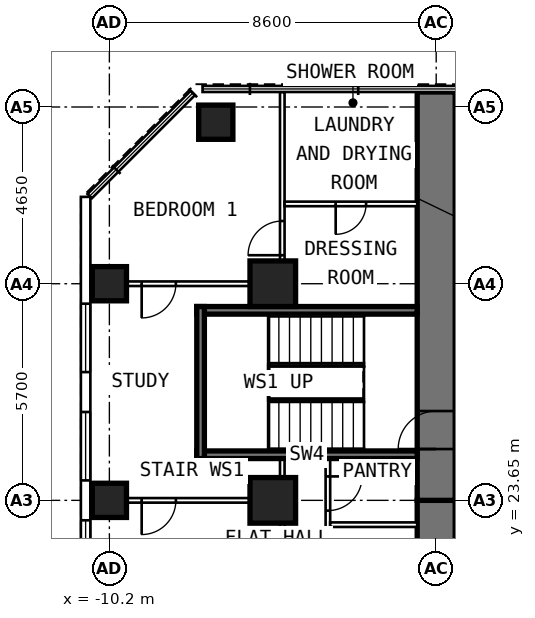
"""IFC4 building model, lengths in metres.
Left out: names, types, materials, properties, quantities, classifications, styles, units other than length and angle.
Written with IfcOpenShell. Run it as: python <this file> out.ifc"""

import sys

from ifc_helpers import new_model, si_unit, direction, frame, frame_2d, origin, origin_2d, place, context, subcontext, project, spatial, rectangle, extrude, element, fill, save


model = new_model("IFC4")
c1 = context("Model", 3, precision=1e-05, world=origin(), true_north=direction((0.0, 1.0)))
c2 = subcontext(c1, "Body", "Model", "MODEL_VIEW")
j1 = project(units=[si_unit("LENGTHUNIT", "METRE"), si_unit("PLANEANGLEUNIT", "RADIAN")], contexts=[c1])
p1 = place(None, origin())
s1 = spatial("IfcSite", under=j1, at=p1, CompositionType="ELEMENT")
p2 = place(p1, origin())
s2 = spatial("IfcBuilding", under=s1, at=p2, CompositionType="ELEMENT")
p3 = place(p2, frame((0.0, 0.0, 80.8)))
s3 = spatial("IfcBuildingStorey", under=s2, at=p3, CompositionType="ELEMENT", Elevation=80.8)
for number, where, z_axis, x_axis in (
    (1, (-10.2, 23.65, 0.0), (0.0, 0.0, 1.0), (0.0, 1.0, 0.0)),
    (2, (-10.2, 29.35, 0.0), (0.0, 0.0, 1.0), (0.0, 1.0, 0.0)),
    (3, (-7.4, 33.6, 0.0), (0.0, 0.0, 1.0), (0.0, 1.0, 0.0)),
):
    element("IfcColumn", number, at=place(p3, frame(where, z_axis=z_axis, x_axis=x_axis)), inside=s3, PredefinedType="COLUMN", context=c2, shape_type="SweptSolid", body=[
        extrude(rectangle(XDim=0.9, YDim=0.9, at=origin_2d()), origin(), (0.0, 0.0, 1.0), 3.6),
    ])
for number, where, z_axis, x_axis in (
    (4, (-5.9, 23.65, 0.0), (0.0, 0.0, 1.0), (0.0, 1.0, 0.0)),
    (5, (-5.9, 29.35, 0.0), (0.0, 0.0, 1.0), (0.0, 1.0, 0.0)),
):
    element("IfcColumn", number, at=place(p3, frame(where, z_axis=z_axis, x_axis=x_axis)), inside=s3, PredefinedType="COLUMN", context=c2, shape_type="SweptSolid", body=[
        extrude(rectangle(XDim=1.2, YDim=1.2, at=origin_2d()), origin(), (0.0, 0.0, 1.0), 3.6),
    ])
p4 = place(p3, frame((-1.6, 17.95, 0.0), z_axis=(0.0, 0.0, 1.0), x_axis=(0.0, 1.0, 0.0)))
e6 = element("IfcWall", 6, at=p4, inside=s3, PredefinedType="SHEAR", context=c2, shape_type="SweptSolid", body=[
    extrude(rectangle(XDim=5.7, YDim=1.0, at=frame_2d((2.85, 0.0))), origin(), (0.0, 0.0, 1.0), 3.6),
])
p5 = place(p4, frame((0.9, 0.0, 0.0)))
e7 = element("IfcOpeningElement", 7, at=p5, cuts=e6, PredefinedType="OPENING", context=c2, shape_type="SweptSolid", body=[
    extrude(rectangle(XDim=1.0, YDim=2.1, at=frame_2d((0.5, 1.05))), frame((0.0, 0.512, 0.0), z_axis=(0.0, -1.0, 0.0), x_axis=(1.0, 0.0, 0.0)), (0.0, 0.0, 1.0), 1.024),
])
p6 = place(p3, frame((-1.6, 23.65, 0.0), z_axis=(0.0, 0.0, 1.0), x_axis=(0.0, 1.0, 0.0)))
e8 = element("IfcWall", 8, at=p6, inside=s3, PredefinedType="SHEAR", context=c2, shape_type="SweptSolid", body=[
    extrude(rectangle(XDim=10.745, YDim=1.0, at=frame_2d((5.373, 0.0))), origin(), (0.0, 0.0, 1.0), 3.6),
])
p7 = place(p6, frame((1.35, 0.0, 0.0)))
e9 = element("IfcOpeningElement", 9, at=p7, cuts=e8, PredefinedType="OPENING", context=c2, shape_type="SweptSolid", body=[
    extrude(rectangle(XDim=1.0, YDim=2.1, at=frame_2d((0.5, 1.05))), frame((0.0, 0.512, 0.0), z_axis=(0.0, -1.0, 0.0), x_axis=(1.0, 0.0, 0.0)), (0.0, 0.0, 1.0), 1.024),
])
p8 = place(p3, frame((-10.825, 6.148, 0.0), z_axis=(0.0, 0.0, 1.0), x_axis=(0.0, 1.0, 0.0)))
e10 = element("IfcWall", 10, at=p8, inside=s3, PredefinedType="SOLIDWALL", context=c2, shape_type="SweptSolid", body=[
    extrude(rectangle(XDim=25.487, YDim=0.25, at=frame_2d((12.744, 0.0))), origin(), (0.0, 0.0, 1.0), 3.35),
])
p9 = place(p8, frame((0.927, 0.0, 0.8)))
e11 = element("IfcOpeningElement", 11, at=p9, cuts=e10, PredefinedType="OPENING", context=c2, shape_type="SweptSolid", body=[
    extrude(rectangle(XDim=1.8, YDim=1.8, at=frame_2d((0.9, 0.9))), frame((0.0, 0.137, 0.0), z_axis=(0.0, -1.0, 0.0), x_axis=(1.0, 0.0, 0.0)), (0.0, 0.0, 1.0), 0.274),
])
p10 = place(p8, frame((3.777, 0.0, 0.8)))
e12 = element("IfcOpeningElement", 12, at=p10, cuts=e10, PredefinedType="OPENING", context=c2, shape_type="SweptSolid", body=[
    extrude(rectangle(XDim=1.8, YDim=1.8, at=frame_2d((0.9, 0.9))), frame((0.0, 0.137, 0.0), z_axis=(0.0, -1.0, 0.0), x_axis=(1.0, 0.0, 0.0)), (0.0, 0.0, 1.0), 0.274),
])
p11 = place(p8, frame((6.627, 0.0, 0.8)))
e13 = element("IfcOpeningElement", 13, at=p11, cuts=e10, PredefinedType="OPENING", context=c2, shape_type="SweptSolid", body=[
    extrude(rectangle(XDim=1.8, YDim=1.8, at=frame_2d((0.9, 0.9))), frame((0.0, 0.137, 0.0), z_axis=(0.0, -1.0, 0.0), x_axis=(1.0, 0.0, 0.0)), (0.0, 0.0, 1.0), 0.274),
])
p12 = place(p8, frame((9.477, 0.0, 0.8)))
e14 = element("IfcOpeningElement", 14, at=p12, cuts=e10, PredefinedType="OPENING", context=c2, shape_type="SweptSolid", body=[
    extrude(rectangle(XDim=1.8, YDim=1.8, at=frame_2d((0.9, 0.9))), frame((0.0, 0.137, 0.0), z_axis=(0.0, -1.0, 0.0), x_axis=(1.0, 0.0, 0.0)), (0.0, 0.0, 1.0), 0.274),
])
p13 = place(p8, frame((12.327, 0.0, 0.8)))
e15 = element("IfcOpeningElement", 15, at=p13, cuts=e10, PredefinedType="OPENING", context=c2, shape_type="SweptSolid", body=[
    extrude(rectangle(XDim=1.8, YDim=1.8, at=frame_2d((0.9, 0.9))), frame((0.0, 0.137, 0.0), z_axis=(0.0, -1.0, 0.0), x_axis=(1.0, 0.0, 0.0)), (0.0, 0.0, 1.0), 0.274),
])
p14 = place(p8, frame((15.177, 0.0, 0.8)))
e16 = element("IfcOpeningElement", 16, at=p14, cuts=e10, PredefinedType="OPENING", context=c2, shape_type="SweptSolid", body=[
    extrude(rectangle(XDim=1.8, YDim=1.8, at=frame_2d((0.9, 0.9))), frame((0.0, 0.137, 0.0), z_axis=(0.0, -1.0, 0.0), x_axis=(1.0, 0.0, 0.0)), (0.0, 0.0, 1.0), 0.274),
])
p15 = place(p8, frame((18.027, 0.0, 0.8)))
e17 = element("IfcOpeningElement", 17, at=p15, cuts=e10, PredefinedType="OPENING", context=c2, shape_type="SweptSolid", body=[
    extrude(rectangle(XDim=1.8, YDim=1.8, at=frame_2d((0.9, 0.9))), frame((0.0, 0.137, 0.0), z_axis=(0.0, -1.0, 0.0), x_axis=(1.0, 0.0, 0.0)), (0.0, 0.0, 1.0), 0.274),
])
p16 = place(p8, frame((20.877, 0.0, 0.8)))
e18 = element("IfcOpeningElement", 18, at=p16, cuts=e10, PredefinedType="OPENING", context=c2, shape_type="SweptSolid", body=[
    extrude(rectangle(XDim=1.8, YDim=1.8, at=frame_2d((0.9, 0.9))), frame((0.0, 0.137, 0.0), z_axis=(0.0, -1.0, 0.0), x_axis=(1.0, 0.0, 0.0)), (0.0, 0.0, 1.0), 0.274),
])
p17 = place(p3, frame((-4.45, 18.05, 0.0), z_axis=(0.0, 0.0, 1.0), x_axis=(0.0, 1.0, 0.0)))
e19 = element("IfcWall", 19, at=p17, inside=s3, PredefinedType="PARTITIONING", context=c2, shape_type="SweptSolid", body=[
    extrude(rectangle(XDim=6.7, YDim=0.12, at=frame_2d((3.35, 0.0))), origin(), (0.0, 0.0, 1.0), 3.35),
])
p18 = place(p17, frame((0.75, 0.0, 0.0)))
e20 = element("IfcOpeningElement", 20, at=p18, cuts=e19, PredefinedType="OPENING", context=c2, shape_type="SweptSolid", body=[
    extrude(rectangle(XDim=0.9, YDim=2.1, at=frame_2d((0.45, 1.05))), frame((0.0, 0.072, 0.0), z_axis=(0.0, -1.0, 0.0), x_axis=(1.0, 0.0, 0.0)), (0.0, 0.0, 1.0), 0.144),
])
p19 = place(p17, frame((3.33, 0.0, 0.0)))
e21 = element("IfcOpeningElement", 21, at=p19, cuts=e19, PredefinedType="OPENING", context=c2, shape_type="SweptSolid", body=[
    extrude(rectangle(XDim=0.8, YDim=2.1, at=frame_2d((0.4, 1.05))), frame((0.0, 0.072, 0.0), z_axis=(0.0, -1.0, 0.0), x_axis=(1.0, 0.0, 0.0)), (0.0, 0.0, 1.0), 0.144),
])
p20 = place(p17, frame((5.33, 0.0, 0.0)))
e22 = element("IfcOpeningElement", 22, at=p20, cuts=e19, PredefinedType="OPENING", context=c2, shape_type="SweptSolid", body=[
    extrude(rectangle(XDim=0.9, YDim=2.1, at=frame_2d((0.45, 1.05))), frame((0.0, 0.072, 0.0), z_axis=(0.0, -1.0, 0.0), x_axis=(1.0, 0.0, 0.0)), (0.0, 0.0, 1.0), 0.144),
])
p21 = place(p3, frame((-5.65, 18.05, 0.0), z_axis=(0.0, 0.0, 1.0), x_axis=(0.0, 1.0, 0.0)))
e23 = element("IfcWall", 23, at=p21, inside=s3, PredefinedType="PARTITIONING", context=c2, shape_type="SweptSolid", body=[
    extrude(rectangle(XDim=6.7, YDim=0.12, at=frame_2d((3.35, 0.0))), origin(), (0.0, 0.0, 1.0), 3.35),
])
p22 = place(p21, frame((2.3, 0.0, 0.0)))
e24 = element("IfcOpeningElement", 24, at=p22, cuts=e23, PredefinedType="OPENING", context=c2, shape_type="SweptSolid", body=[
    extrude(rectangle(XDim=0.9, YDim=2.1, at=frame_2d((0.45, 1.05))), frame((0.0, 0.072, 0.0), z_axis=(0.0, -1.0, 0.0), x_axis=(1.0, 0.0, 0.0)), (0.0, 0.0, 1.0), 0.144),
])
p23 = place(p3, frame((-2.1, 23.01, 0.0), z_axis=(0.0, 0.0, 1.0), x_axis=(-1.0, 0.0, 0.0)))
e25 = element("IfcWall", 25, at=p23, inside=s3, PredefinedType="PARTITIONING", context=c2, shape_type="SweptSolid", body=[
    extrude(rectangle(XDim=2.29, YDim=0.12, at=frame_2d((1.145, 0.0))), origin(), (0.0, 0.0, 1.0), 3.35),
])
p24 = place(p3, frame((-5.71, 23.65, 0.0), z_axis=(0.0, 0.0, 1.0), x_axis=(-1.0, 0.0, 0.0)))
e26 = element("IfcWall", 26, at=p24, inside=s3, PredefinedType="PARTITIONING", context=c2, shape_type="SweptSolid", body=[
    extrude(rectangle(XDim=4.99, YDim=0.12, at=frame_2d((2.495, 0.0))), origin(), (0.0, 0.0, 1.0), 2.45),
])
p25 = place(p24, frame((2.74, 0.0, 0.0)))
e27 = element("IfcOpeningElement", 27, at=p25, cuts=e26, PredefinedType="OPENING", context=c2, shape_type="SweptSolid", body=[
    extrude(rectangle(XDim=0.9, YDim=2.1, at=frame_2d((0.45, 1.05))), frame((0.0, 0.072, 0.0), z_axis=(0.0, -1.0, 0.0), x_axis=(1.0, 0.0, 0.0)), (0.0, 0.0, 1.0), 0.144),
])
p26 = place(p3, frame((-5.71, 29.35, 0.0), z_axis=(0.0, 0.0, 1.0), x_axis=(-1.0, 0.0, 0.0)))
e28 = element("IfcWall", 28, at=p26, inside=s3, PredefinedType="PARTITIONING", context=c2, shape_type="SweptSolid", body=[
    extrude(rectangle(XDim=4.99, YDim=0.12, at=frame_2d((2.495, 0.0))), origin(), (0.0, 0.0, 1.0), 2.45),
])
p27 = place(p26, frame((2.74, 0.0, 0.0)))
e29 = element("IfcOpeningElement", 29, at=p27, cuts=e28, PredefinedType="OPENING", context=c2, shape_type="SweptSolid", body=[
    extrude(rectangle(XDim=0.9, YDim=2.1, at=frame_2d((0.45, 1.05))), frame((0.0, 0.072, 0.0), z_axis=(0.0, -1.0, 0.0), x_axis=(1.0, 0.0, 0.0)), (0.0, 0.0, 1.0), 0.144),
])
p28 = place(p3, frame((-5.65, 28.95, 0.0), z_axis=(0.0, 0.0, 1.0), x_axis=(0.0, 1.0, 0.0)))
e30 = element("IfcWall", 30, at=p28, inside=s3, PredefinedType="PARTITIONING", context=c2, shape_type="SweptSolid", body=[
    extrude(rectangle(XDim=5.445, YDim=0.12, at=frame_2d((2.723, 0.0))), origin(), (0.0, 0.0, 1.0), 3.35),
])
p29 = place(p28, frame((1.15, 0.0, 0.0)))
e31 = element("IfcOpeningElement", 31, at=p29, cuts=e30, PredefinedType="OPENING", context=c2, shape_type="SweptSolid", body=[
    extrude(rectangle(XDim=0.9, YDim=2.1, at=frame_2d((0.45, 1.05))), frame((0.0, 0.072, 0.0), z_axis=(0.0, -1.0, 0.0), x_axis=(1.0, 0.0, 0.0)), (0.0, 0.0, 1.0), 0.144),
])
p30 = place(p3, frame((-2.1, 31.45, 0.0), z_axis=(0.0, 0.0, 1.0), x_axis=(-1.0, 0.0, 0.0)))
e32 = element("IfcWall", 32, at=p30, inside=s3, PredefinedType="PARTITIONING", context=c2, shape_type="SweptSolid", body=[
    extrude(rectangle(XDim=3.49, YDim=0.12, at=frame_2d((1.745, 0.0))), origin(), (0.0, 0.0, 1.0), 3.35),
])
p31 = place(p30, frame((1.345, 0.0, 0.0)))
e33 = element("IfcOpeningElement", 33, at=p31, cuts=e32, PredefinedType="OPENING", context=c2, shape_type="SweptSolid", body=[
    extrude(rectangle(XDim=0.8, YDim=2.1, at=frame_2d((0.4, 1.05))), frame((0.0, 0.072, 0.0), z_axis=(0.0, -1.0, 0.0), x_axis=(1.0, 0.0, 0.0)), (0.0, 0.0, 1.0), 0.144),
])
for number, where, z_axis, x_axis in (
    (34, (-2.1, 24.85, 0.0), (0.0, 0.0, 1.0), (-1.0, 0.0, 0.0)),
    (35, (-2.1, 28.65, 0.0), (0.0, 0.0, 1.0), (-1.0, 0.0, 0.0)),
):
    element("IfcWall", number, at=place(p3, frame(where, z_axis=z_axis, x_axis=x_axis)), inside=s3, PredefinedType="SHEAR", context=c2, shape_type="SweptSolid", body=[
        extrude(rectangle(XDim=5.8, YDim=0.2, at=frame_2d((2.9, 0.0))), origin(), (0.0, 0.0, 1.0), 3.33),
    ])
p32 = place(p3, frame((-7.8, 24.75, 0.0), z_axis=(0.0, 0.0, 1.0), x_axis=(0.0, 1.0, 0.0)))
e36 = element("IfcWall", 36, at=p32, inside=s3, PredefinedType="SHEAR", context=c2, shape_type="SweptSolid", body=[
    extrude(rectangle(XDim=4.0, YDim=0.2, at=frame_2d((2.0, 0.0))), origin(), (0.0, 0.0, 1.0), 3.33),
])
p33 = place(p14, origin())
e37 = element("IfcWindow", 37, at=p33, inside=s3, PartitioningType="SINGLE_PANEL", PredefinedType="WINDOW", context=c2, shape_type="SweptSolid", body=[
    extrude(rectangle(XDim=1.8, YDim=1.8, at=frame_2d((0.9, 0.9))), frame((0.0, 0.03, 0.0), z_axis=(0.0, -1.0, 0.0), x_axis=(1.0, 0.0, 0.0)), (0.0, 0.0, 1.0), 0.06),
])
fill(e16, e37)
p34 = place(p15, origin())
e38 = element("IfcWindow", 38, at=p34, inside=s3, PartitioningType="SINGLE_PANEL", PredefinedType="WINDOW", context=c2, shape_type="SweptSolid", body=[
    extrude(rectangle(XDim=1.8, YDim=1.8, at=frame_2d((0.9, 0.9))), frame((0.0, 0.03, 0.0), z_axis=(0.0, -1.0, 0.0), x_axis=(1.0, 0.0, 0.0)), (0.0, 0.0, 1.0), 0.06),
])
fill(e17, e38)
p35 = place(p16, origin())
e39 = element("IfcWindow", 39, at=p35, inside=s3, PartitioningType="SINGLE_PANEL", PredefinedType="WINDOW", context=c2, shape_type="SweptSolid", body=[
    extrude(rectangle(XDim=1.8, YDim=1.8, at=frame_2d((0.9, 0.9))), frame((0.0, 0.03, 0.0), z_axis=(0.0, -1.0, 0.0), x_axis=(1.0, 0.0, 0.0)), (0.0, 0.0, 1.0), 0.06),
])
fill(e18, e39)
p36 = place(p20, frame((0.9, 0.0, 0.0), z_axis=(0.0, 0.0, 1.0), x_axis=(-1.0, 0.0, 0.0)))
e40 = element("IfcDoor", 40, at=p36, inside=s3, OperationType="SINGLE_SWING_LEFT", PredefinedType="DOOR", context=c2, shape_type="SweptSolid", body=[
    extrude(rectangle(XDim=0.9, YDim=2.1, at=frame_2d((0.45, 1.05))), frame((0.0, 0.025, 0.0), z_axis=(0.0, -1.0, 0.0), x_axis=(1.0, 0.0, 0.0)), (0.0, 0.0, 1.0), 0.05),
])
fill(e22, e40)
p37 = place(p27, origin())
e41 = element("IfcDoor", 41, at=p37, inside=s3, OperationType="SINGLE_SWING_RIGHT", PredefinedType="DOOR", context=c2, shape_type="SweptSolid", body=[
    extrude(rectangle(XDim=0.9, YDim=2.1, at=frame_2d((0.45, 1.05))), frame((0.0, 0.025, 0.0), z_axis=(0.0, -1.0, 0.0), x_axis=(1.0, 0.0, 0.0)), (0.0, 0.0, 1.0), 0.05),
])
fill(e29, e41)
p38 = place(p29, origin())
e42 = element("IfcDoor", 42, at=p38, inside=s3, OperationType="SINGLE_SWING_LEFT", PredefinedType="DOOR", context=c2, shape_type="SweptSolid", body=[
    extrude(rectangle(XDim=0.9, YDim=2.1, at=frame_2d((0.45, 1.05))), frame((0.0, 0.025, 0.0), z_axis=(0.0, -1.0, 0.0), x_axis=(1.0, 0.0, 0.0)), (0.0, 0.0, 1.0), 0.05),
])
fill(e31, e42)
p39 = place(p31, origin())
e43 = element("IfcDoor", 43, at=p39, inside=s3, OperationType="SINGLE_SWING_RIGHT", PredefinedType="DOOR", context=c2, shape_type="SweptSolid", body=[
    extrude(rectangle(XDim=0.8, YDim=2.1, at=frame_2d((0.4, 1.05))), frame((0.0, 0.025, 0.0), z_axis=(0.0, -1.0, 0.0), x_axis=(1.0, 0.0, 0.0)), (0.0, 0.0, 1.0), 0.05),
])
fill(e33, e43)
p40 = place(p25, origin())
e44 = element("IfcDoor", 44, at=p40, inside=s3, OperationType="SINGLE_SWING_RIGHT", PredefinedType="DOOR", context=c2, shape_type="SweptSolid", body=[
    extrude(rectangle(XDim=0.9, YDim=2.1, at=frame_2d((0.45, 1.05))), frame((0.0, 0.025, 0.0), z_axis=(0.0, -1.0, 0.0), x_axis=(1.0, 0.0, 0.0)), (0.0, 0.0, 1.0), 0.05),
])
fill(e27, e44)
p41 = place(p7, origin())
e45 = element("IfcDoor", 45, at=p41, inside=s3, OperationType="SINGLE_SWING_LEFT", PredefinedType="DOOR", context=c2, shape_type="SweptSolid", body=[
    extrude(rectangle(XDim=1.0, YDim=2.1, at=frame_2d((0.5, 1.05))), frame((0.0, 0.25, 0.0), z_axis=(0.0, -1.0, 0.0), x_axis=(1.0, 0.0, 0.0)), (0.0, 0.0, 1.0), 0.5),
])
fill(e9, e45)
save(model, sys.argv[1])
